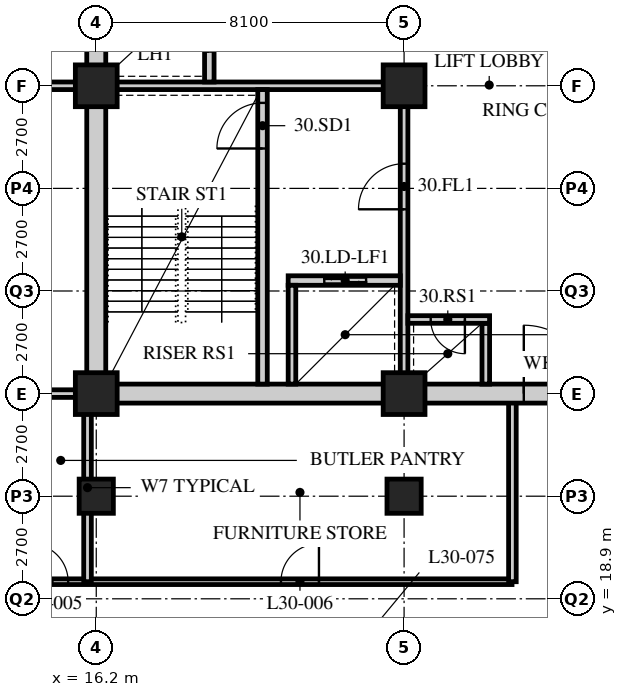
"""IFC4 building model, lengths in metres.
Left out: names, types, materials, properties, quantities, classifications, styles, units other than length and angle.
Written with IfcOpenShell. Run it as: python <this file> out.ifc"""

import sys

from ifc_helpers import new_model, si_unit, direction, frame, frame_2d, origin, origin_2d, place, context, subcontext, project, spatial, rectangle, hollow_rectangle, extrude, element, fill, save


model = new_model("IFC4")
c1 = context("Model", 3, precision=1e-05, world=origin(), true_north=direction((0.0, 1.0)))
c2 = subcontext(c1, "Body", "Model", "MODEL_VIEW")
j1 = project(units=[si_unit("LENGTHUNIT", "METRE"), si_unit("PLANEANGLEUNIT", "RADIAN")], contexts=[c1])
p1 = place(None, origin())
s1 = spatial("IfcSite", under=j1, at=p1, CompositionType="ELEMENT")
p2 = place(p1, origin())
s2 = spatial("IfcBuilding", under=s1, at=p2, CompositionType="ELEMENT")
p3 = place(p2, frame((0.0, 0.0, 120.4)))
s3 = spatial("IfcBuildingStorey", under=s2, at=p3, CompositionType="ELEMENT", Elevation=120.4)
p4 = place(p3, frame((16.2, 21.6, 0.0), z_axis=(0.0, 0.0, 1.0), x_axis=(1.0, 0.0, 0.0)))
e1 = element("IfcColumn", 1, at=p4, inside=s3, PredefinedType="COLUMN", context=c2, shape_type="SweptSolid", body=[
    extrude(hollow_rectangle(XDim=0.9, YDim=0.9, WallThickness=0.09, at=origin_2d()), origin(), (0.0, 0.0, 1.0), 3.4),
])
for number, where, z_axis, x_axis in (
    (2, (16.2, 24.3, 0.0), (0.0, 0.0, 1.0), (1.0, 0.0, 0.0)),
    (3, (16.2, 32.4, 0.0), (0.0, 0.0, 1.0), (1.0, 0.0, 0.0)),
):
    element("IfcColumn", number, at=place(p3, frame(where, z_axis=z_axis, x_axis=x_axis)), inside=s3, PredefinedType="COLUMN", context=c2, shape_type="SweptSolid", body=[
        extrude(hollow_rectangle(XDim=1.1, YDim=1.1, WallThickness=0.1, at=origin_2d()), origin(), (0.0, 0.0, 1.0), 3.4),
    ])
p5 = place(p3, frame((24.3, 21.6, 0.0), z_axis=(0.0, 0.0, 1.0), x_axis=(1.0, 0.0, 0.0)))
e4 = element("IfcColumn", 4, at=p5, inside=s3, PredefinedType="COLUMN", context=c2, shape_type="SweptSolid", body=[
    extrude(hollow_rectangle(XDim=0.9, YDim=0.9, WallThickness=0.09, at=origin_2d()), origin(), (0.0, 0.0, 1.0), 3.4),
])
for number, where, z_axis, x_axis in (
    (5, (24.3, 24.3, 0.0), (0.0, 0.0, 1.0), (1.0, 0.0, 0.0)),
    (6, (24.3, 32.4, 0.0), (0.0, 0.0, 1.0), (1.0, 0.0, 0.0)),
):
    element("IfcColumn", number, at=place(p3, frame(where, z_axis=z_axis, x_axis=x_axis)), inside=s3, PredefinedType="COLUMN", context=c2, shape_type="SweptSolid", body=[
        extrude(hollow_rectangle(XDim=1.1, YDim=1.1, WallThickness=0.1, at=origin_2d()), origin(), (0.0, 0.0, 1.0), 3.4),
    ])
p6 = place(p3, frame((13.95, 19.35, 0.0), z_axis=(0.0, 0.0, 1.0), x_axis=(1.0, 0.0, 0.0)))
e7 = element("IfcWall", 7, at=p6, inside=s3, PredefinedType="PARTITIONING", context=c2, shape_type="SweptSolid", body=[
    extrude(rectangle(XDim=13.19, YDim=0.15, at=frame_2d((6.595, 0.0))), origin(), (0.0, 0.0, 1.0), 3.19),
])
p7 = place(p6, frame((0.51, 0.0, 0.0)))
e8 = element("IfcOpeningElement", 8, at=p7, cuts=e7, PredefinedType="OPENING", context=c2, shape_type="SweptSolid", body=[
    extrude(rectangle(XDim=1.0, YDim=2.1, at=frame_2d((0.5, 1.05))), frame((0.0, 0.085, 0.0), z_axis=(0.0, -1.0, 0.0), x_axis=(1.0, 0.0, 0.0)), (0.0, 0.0, 1.0), 0.17),
])
p8 = place(p6, frame((7.11, 0.0, 0.0)))
e9 = element("IfcOpeningElement", 9, at=p8, cuts=e7, PredefinedType="OPENING", context=c2, shape_type="SweptSolid", body=[
    extrude(rectangle(XDim=1.0, YDim=2.1, at=frame_2d((0.5, 1.05))), frame((0.0, 0.085, 0.0), z_axis=(0.0, -1.0, 0.0), x_axis=(1.0, 0.0, 0.0)), (0.0, 0.0, 1.0), 0.17),
])
p9 = place(p3, frame((13.95, 32.4, 0.0), z_axis=(0.0, 0.0, 1.0), x_axis=(1.0, 0.0, 0.0)))
e10 = element("IfcWall", 10, at=p9, inside=s3, PredefinedType="SOLIDWALL", context=c2, shape_type="SweptSolid", body=[
    extrude(rectangle(XDim=2.25, YDim=0.2, at=frame_2d((1.125, 0.0))), origin(), (0.0, 0.0, 1.0), 3.19),
])
p10 = place(p3, frame((15.97, 19.35, 0.0), z_axis=(0.0, 0.0, 1.0), x_axis=(0.0, 1.0, 0.0)))
e11 = element("IfcWall", 11, at=p10, inside=s3, PredefinedType="SOLIDWALL", context=c2, shape_type="SweptSolid", body=[
    extrude(rectangle(XDim=4.95, YDim=0.2, at=frame_2d((2.475, 0.0))), origin(), (0.0, 0.0, 1.0), 2.49),
])
p11 = place(p3, frame((27.15, 19.35, 0.0), z_axis=(0.0, 0.0, 1.0), x_axis=(0.0, 1.0, 0.0)))
e12 = element("IfcWall", 12, at=p11, inside=s3, PredefinedType="SOLIDWALL", context=c2, shape_type="SweptSolid", body=[
    extrude(rectangle(XDim=4.95, YDim=0.2, at=frame_2d((2.475, 0.0))), origin(), (0.0, 0.0, 1.0), 3.19),
])
p12 = place(p3, frame((13.95, 24.3, 0.0), z_axis=(0.0, 0.0, 1.0), x_axis=(1.0, 0.0, 0.0)))
e13 = element("IfcWall", 13, at=p12, inside=s3, PredefinedType="SOLIDWALL", context=c2, shape_type="SweptSolid", body=[
    extrude(rectangle(XDim=2.25, YDim=0.2, at=frame_2d((1.125, 0.0))), origin(), (0.0, 0.0, 1.0), 3.19),
])
p13 = place(p3, frame((15.95, 24.3, 0.0), z_axis=(0.0, 0.0, 1.0), x_axis=(1.0, 0.0, 0.0)))
e14 = element("IfcWall", 14, at=p13, inside=s3, PredefinedType="SOLIDWALL", context=c2, shape_type="SweptSolid", body=[
    extrude(rectangle(XDim=24.8, YDim=0.5, at=frame_2d((12.4, 0.0))), origin(), (0.0, 0.0, 1.0), 2.54),
])
p14 = place(p13, frame((11.5, 0.0, 0.0)))
e15 = element("IfcOpeningElement", 15, at=p14, cuts=e14, PredefinedType="OPENING", context=c2, shape_type="SweptSolid", body=[
    extrude(rectangle(XDim=1.8, YDim=2.4, at=frame_2d((0.9, 1.2))), frame((0.0, 0.26, 0.0), z_axis=(0.0, -1.0, 0.0), x_axis=(1.0, 0.0, 0.0)), (0.0, 0.0, 1.0), 0.52),
])
p15 = place(p3, frame((16.2, 24.55, 0.0), z_axis=(0.0, 0.0, 1.0), x_axis=(0.0, 1.0, 0.0)))
e16 = element("IfcWall", 16, at=p15, inside=s3, PredefinedType="SOLIDWALL", context=c2, shape_type="SweptSolid", body=[
    extrude(rectangle(XDim=15.7, YDim=0.5, at=frame_2d((7.85, 0.0))), origin(), (0.0, 0.0, 1.0), 2.578),
])
p16 = place(p3, frame((16.45, 32.4, 0.0), z_axis=(0.0, 0.0, 1.0), x_axis=(1.0, 0.0, 0.0)))
e17 = element("IfcWall", 17, at=p16, inside=s3, PredefinedType="SOLIDWALL", context=c2, shape_type="SweptSolid", body=[
    extrude(rectangle(XDim=7.95, YDim=0.2, at=frame_2d((3.975, 0.0))), origin(), (0.0, 0.0, 1.0), 2.578),
])
p17 = place(p3, frame((24.3, 24.55, 0.0), z_axis=(0.0, 0.0, 1.0), x_axis=(0.0, 1.0, 0.0)))
e18 = element("IfcWall", 18, at=p17, inside=s3, PredefinedType="SOLIDWALL", context=c2, shape_type="SweptSolid", body=[
    extrude(rectangle(XDim=7.75, YDim=0.2, at=frame_2d((3.875, 0.0))), origin(), (0.0, 0.0, 1.0), 2.578),
])
p18 = place(p17, frame((4.6, 0.0, 0.0)))
e19 = element("IfcOpeningElement", 19, at=p18, cuts=e18, PredefinedType="OPENING", context=c2, shape_type="SweptSolid", body=[
    extrude(rectangle(XDim=1.2, YDim=2.1, at=frame_2d((0.6, 1.05))), frame((0.0, 0.11, 0.0), z_axis=(0.0, -1.0, 0.0), x_axis=(1.0, 0.0, 0.0)), (0.0, 0.0, 1.0), 0.22),
])
p19 = place(p3, frame((20.575, 24.55, 0.0), z_axis=(0.0, 0.0, 1.0), x_axis=(0.0, 1.0, 0.0)))
e20 = element("IfcWall", 20, at=p19, inside=s3, PredefinedType="SOLIDWALL", context=c2, shape_type="SweptSolid", body=[
    extrude(rectangle(XDim=7.75, YDim=0.25, at=frame_2d((3.875, 0.0))), origin(), (0.0, 0.0, 1.0), 3.19),
])
p20 = place(p19, frame((6.2, 0.0, 0.0)))
e21 = element("IfcOpeningElement", 21, at=p20, cuts=e20, PredefinedType="OPENING", context=c2, shape_type="SweptSolid", body=[
    extrude(rectangle(XDim=1.2, YDim=2.1, at=frame_2d((0.6, 1.05))), frame((0.0, 0.135, 0.0), z_axis=(0.0, -1.0, 0.0), x_axis=(1.0, 0.0, 0.0)), (0.0, 0.0, 1.0), 0.27),
])
p21 = place(p3, frame((21.25, 27.275, 0.0), z_axis=(0.0, 0.0, 1.0), x_axis=(1.0, 0.0, 0.0)))
e22 = element("IfcWall", 22, at=p21, inside=s3, PredefinedType="SOLIDWALL", context=c2, shape_type="SweptSolid", body=[
    extrude(rectangle(XDim=2.95, YDim=0.25, at=frame_2d((1.475, 0.0))), origin(), (0.0, 0.0, 1.0), 3.19),
])
p22 = place(p21, frame((0.95, 0.0, 0.0)))
e23 = element("IfcOpeningElement", 23, at=p22, cuts=e22, PredefinedType="OPENING", context=c2, shape_type="SweptSolid", body=[
    extrude(rectangle(XDim=1.1, YDim=2.4, at=frame_2d((0.55, 1.2))), frame((0.0, 0.135, 0.0), z_axis=(0.0, -1.0, 0.0), x_axis=(1.0, 0.0, 0.0)), (0.0, 0.0, 1.0), 0.27),
])
p23 = place(p3, frame((21.35, 24.55, 0.0), z_axis=(0.0, 0.0, 1.0), x_axis=(0.0, 1.0, 0.0)))
e24 = element("IfcWall", 24, at=p23, inside=s3, PredefinedType="SOLIDWALL", context=c2, shape_type="SweptSolid", body=[
    extrude(rectangle(XDim=2.6, YDim=0.2, at=frame_2d((1.3, 0.0))), origin(), (0.0, 0.0, 1.0), 3.19),
])
p24 = place(p3, frame((19.175, 32.5, 0.0), z_axis=(0.0, 0.0, 1.0), x_axis=(0.0, 1.0, 0.0)))
e25 = element("IfcWall", 25, at=p24, inside=s3, PredefinedType="SOLIDWALL", context=c2, shape_type="SweptSolid", body=[
    extrude(rectangle(XDim=7.75, YDim=0.25, at=frame_2d((3.875, 0.0))), origin(), (0.0, 0.0, 1.0), 3.19),
])
p25 = place(p24, frame((0.8, 0.0, 0.0)))
e26 = element("IfcOpeningElement", 26, at=p25, cuts=e25, PredefinedType="OPENING", context=c2, shape_type="SweptSolid", body=[
    extrude(rectangle(XDim=1.1, YDim=2.4, at=frame_2d((0.55, 1.2))), frame((0.0, 0.135, 0.0), z_axis=(0.0, -1.0, 0.0), x_axis=(1.0, 0.0, 0.0)), (0.0, 0.0, 1.0), 0.27),
])
p26 = place(p24, frame((3.4, 0.0, 0.0)))
e27 = element("IfcOpeningElement", 27, at=p26, cuts=e25, PredefinedType="OPENING", context=c2, shape_type="SweptSolid", body=[
    extrude(rectangle(XDim=1.1, YDim=2.4, at=frame_2d((0.55, 1.2))), frame((0.0, 0.135, 0.0), z_axis=(0.0, -1.0, 0.0), x_axis=(1.0, 0.0, 0.0)), (0.0, 0.0, 1.0), 0.27),
])
p27 = place(p24, frame((6.0, 0.0, 0.0)))
e28 = element("IfcOpeningElement", 28, at=p27, cuts=e25, PredefinedType="OPENING", context=c2, shape_type="SweptSolid", body=[
    extrude(rectangle(XDim=1.1, YDim=2.4, at=frame_2d((0.55, 1.2))), frame((0.0, 0.135, 0.0), z_axis=(0.0, -1.0, 0.0), x_axis=(1.0, 0.0, 0.0)), (0.0, 0.0, 1.0), 0.27),
])
p28 = place(p3, frame((26.45, 24.55, 0.0), z_axis=(0.0, 0.0, 1.0), x_axis=(0.0, 1.0, 0.0)))
e29 = element("IfcWall", 29, at=p28, inside=s3, PredefinedType="SOLIDWALL", context=c2, shape_type="SweptSolid", body=[
    extrude(rectangle(XDim=1.6, YDim=0.2, at=frame_2d((0.8, 0.0))), origin(), (0.0, 0.0, 1.0), 3.19),
])
p29 = place(p3, frame((24.4, 26.25, 0.0), z_axis=(0.0, 0.0, 1.0), x_axis=(1.0, 0.0, 0.0)))
e30 = element("IfcWall", 30, at=p29, inside=s3, PredefinedType="SOLIDWALL", context=c2, shape_type="SweptSolid", body=[
    extrude(rectangle(XDim=2.15, YDim=0.2, at=frame_2d((1.075, 0.0))), origin(), (0.0, 0.0, 1.0), 3.19),
])
p30 = place(p29, frame((0.6, 0.0, 0.0)))
e31 = element("IfcOpeningElement", 31, at=p30, cuts=e30, PredefinedType="OPENING", context=c2, shape_type="SweptSolid", body=[
    extrude(rectangle(XDim=0.9, YDim=2.1, at=frame_2d((0.45, 1.05))), frame((0.0, 0.11, 0.0), z_axis=(0.0, -1.0, 0.0), x_axis=(1.0, 0.0, 0.0)), (0.0, 0.0, 1.0), 0.22),
])
p31 = place(p7, origin())
e32 = element("IfcDoor", 32, at=p31, inside=s3, OperationType="SINGLE_SWING_LEFT", PredefinedType="DOOR", context=c2, shape_type="SweptSolid", body=[
    extrude(rectangle(XDim=1.0, YDim=2.1, at=frame_2d((0.5, 1.05))), frame((0.0, 0.025, 0.0), z_axis=(0.0, -1.0, 0.0), x_axis=(1.0, 0.0, 0.0)), (0.0, 0.0, 1.0), 0.05),
])
fill(e8, e32)
p32 = place(p8, origin())
e33 = element("IfcDoor", 33, at=p32, inside=s3, OperationType="SINGLE_SWING_RIGHT", PredefinedType="DOOR", context=c2, shape_type="SweptSolid", body=[
    extrude(rectangle(XDim=1.0, YDim=2.1, at=frame_2d((0.5, 1.05))), frame((0.0, 0.025, 0.0), z_axis=(0.0, -1.0, 0.0), x_axis=(1.0, 0.0, 0.0)), (0.0, 0.0, 1.0), 0.05),
])
fill(e9, e33)
p33 = place(p20, origin())
e34 = element("IfcDoor", 34, at=p33, inside=s3, OperationType="SINGLE_SWING_LEFT", PredefinedType="DOOR", context=c2, shape_type="SweptSolid", body=[
    extrude(rectangle(XDim=1.2, YDim=2.1, at=frame_2d((0.6, 1.05))), frame((0.0, 0.025, 0.0), z_axis=(0.0, -1.0, 0.0), x_axis=(1.0, 0.0, 0.0)), (0.0, 0.0, 1.0), 0.05),
])
fill(e21, e34)
p34 = place(p18, origin())
e35 = element("IfcDoor", 35, at=p34, inside=s3, OperationType="SINGLE_SWING_LEFT", PredefinedType="DOOR", context=c2, shape_type="SweptSolid", body=[
    extrude(rectangle(XDim=1.2, YDim=2.1, at=frame_2d((0.6, 1.05))), frame((0.0, 0.025, 0.0), z_axis=(0.0, -1.0, 0.0), x_axis=(1.0, 0.0, 0.0)), (0.0, 0.0, 1.0), 0.05),
])
fill(e19, e35)
p35 = place(p30, origin())
e36 = element("IfcDoor", 36, at=p35, inside=s3, OperationType="SINGLE_SWING_LEFT", PredefinedType="DOOR", context=c2, shape_type="SweptSolid", body=[
    extrude(rectangle(XDim=0.9, YDim=2.1, at=frame_2d((0.45, 1.05))), frame((0.0, 0.025, 0.0), z_axis=(0.0, -1.0, 0.0), x_axis=(1.0, 0.0, 0.0)), (0.0, 0.0, 1.0), 0.05),
])
fill(e31, e36)
p36 = place(p22, origin())
e37 = element("IfcDoor", 37, at=p36, inside=s3, OperationType="DOUBLE_DOOR_SLIDING", PredefinedType="DOOR", context=c2, shape_type="SweptSolid", body=[
    extrude(rectangle(XDim=1.1, YDim=2.4, at=frame_2d((0.55, 1.2))), frame((0.0, 0.025, 0.0), z_axis=(0.0, -1.0, 0.0), x_axis=(1.0, 0.0, 0.0)), (0.0, 0.0, 1.0), 0.05),
])
fill(e23, e37)
p37 = place(p14, origin())
e38 = element("IfcDoor", 38, at=p37, inside=s3, OperationType="DOUBLE_DOOR_SINGLE_SWING", PredefinedType="DOOR", context=c2, shape_type="SweptSolid", body=[
    extrude(rectangle(XDim=1.8, YDim=2.4, at=frame_2d((0.9, 1.2))), frame((0.0, 0.025, 0.0), z_axis=(0.0, -1.0, 0.0), x_axis=(1.0, 0.0, 0.0)), (0.0, 0.0, 1.0), 0.05),
])
fill(e15, e38)
save(model, sys.argv[1])
